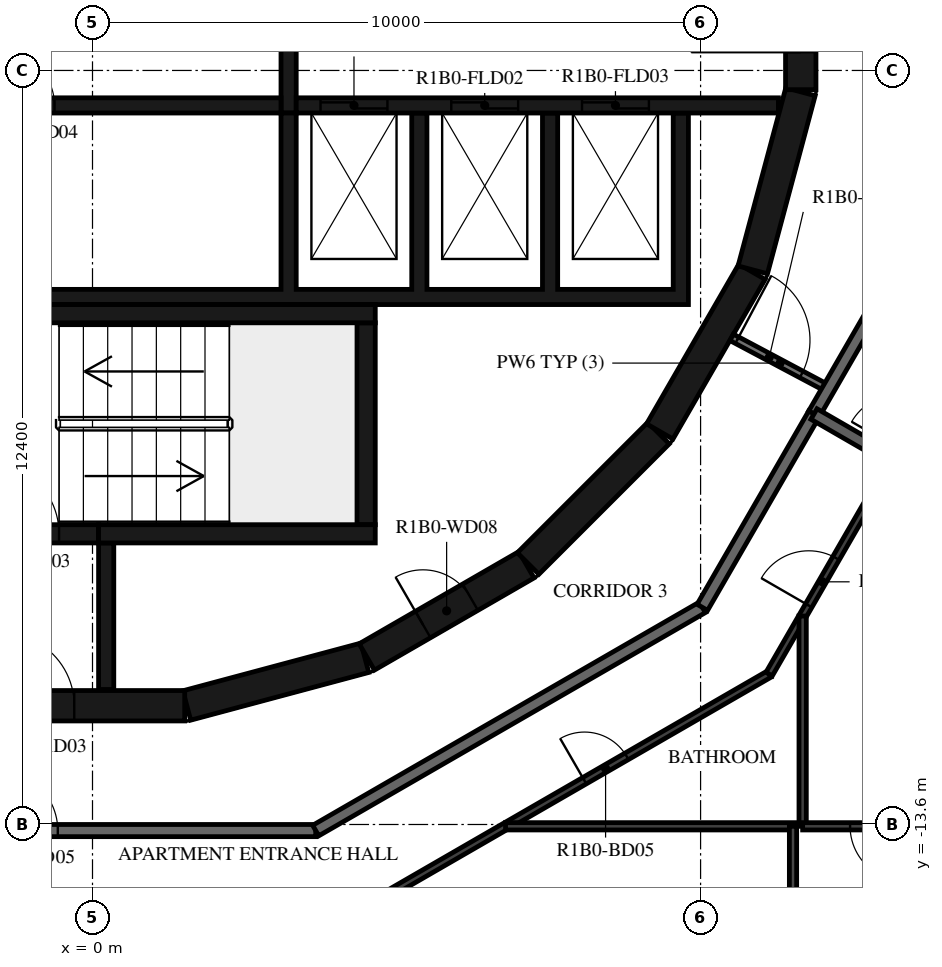
"""IFC4 building model, lengths in metres.
Left out: names, types, materials, properties, quantities, classifications, styles, units other than length and angle.
Written with IfcOpenShell. Run it as: python <this file> out.ifc"""

import sys

from ifc_helpers import new_model, si_unit, direction, frame, frame_2d, origin, place, context, subcontext, project, spatial, polyline, rectangle, outline, extrude, element, fill, save


model = new_model("IFC4")
c1 = context("Model", 3, precision=1e-05, world=origin(), true_north=direction((0.0, 1.0)))
c2 = subcontext(c1, "Body", "Model", "MODEL_VIEW")
j1 = project(units=[si_unit("LENGTHUNIT", "METRE"), si_unit("PLANEANGLEUNIT", "RADIAN")], contexts=[c1])
p1 = place(None, origin())
s1 = spatial("IfcSite", under=j1, at=p1, CompositionType="ELEMENT")
p2 = place(p1, origin())
s2 = spatial("IfcBuilding", under=s1, at=p2, CompositionType="ELEMENT")
p3 = place(p2, frame((0.0, 0.0, 52.4)))
s3 = spatial("IfcBuildingStorey", under=s2, at=p3, CompositionType="ELEMENT", Elevation=52.4)
p4 = place(p3, frame((1.55, -11.643, 0.0), z_axis=(0.0, 0.0, 1.0), x_axis=(0.965948410781, 0.258734743916, 0.0)))
e1 = element("IfcWall", 1, at=p4, inside=s3, PredefinedType="SHEAR", context=c2, shape_type="SweptSolid", body=[
    extrude(rectangle(XDim=3.033, YDim=0.5, at=frame_2d((1.516, 0.0))), origin(), (0.0, 0.0, 1.0), 3.12),
])
p5 = place(p3, frame((4.51, -10.845, 0.0), z_axis=(0.0, 0.0, 1.0), x_axis=(0.865975092491, 0.500087131594, 0.0)))
e2 = element("IfcWall", 2, at=p5, inside=s3, PredefinedType="SHEAR", context=c2, shape_type="SweptSolid", body=[
    extrude(rectangle(XDim=3.033, YDim=0.5, at=frame_2d((1.516, 0.0))), origin(), (0.0, 0.0, 1.0), 3.12),
])
p6 = place(p5, frame((1.066, 0.0, 0.0)))
e3 = element("IfcOpeningElement", 3, at=p6, cuts=e2, PredefinedType="OPENING", context=c2, shape_type="SweptSolid", body=[
    extrude(rectangle(XDim=0.9, YDim=2.1, at=frame_2d((0.45, 1.05))), frame((0.0, 0.26, 0.0), z_axis=(0.0, -1.0, 0.0), x_axis=(1.0, 0.0, 0.0)), (0.0, 0.0, 1.0), 0.52),
])
p7 = place(p3, frame((7.164, -9.308, 0.0), z_axis=(0.0, 0.0, 1.0), x_axis=(0.707106781187, 0.707106781187, 0.0)))
e4 = element("IfcWall", 4, at=p7, inside=s3, PredefinedType="SHEAR", context=c2, shape_type="SweptSolid", body=[
    extrude(rectangle(XDim=3.032, YDim=0.5, at=frame_2d((1.516, 0.0))), origin(), (0.0, 0.0, 1.0), 3.12),
])
for number, where, z_axis, x_axis in (
    (5, (9.329, -7.137, 0.0), (0.0, 0.0, 1.0), (0.5, 0.866, 0.0)),
    (6, (10.858, -4.479, 0.0), (0.0, 0.0, 1.0), (0.259, 0.966, 0.0)),
):
    element("IfcWall", number, at=place(p3, frame(where, z_axis=z_axis, x_axis=x_axis)), inside=s3, PredefinedType="SHEAR", context=c2, shape_type="SweptSolid", body=[
        extrude(rectangle(XDim=3.033, YDim=0.5, at=frame_2d((1.516, 0.0))), origin(), (0.0, 0.0, 1.0), 3.12),
    ])
p8 = place(p3, frame((11.647, -1.516, 0.0), z_axis=(0.0, 0.0, 1.0), x_axis=(0.0, 1.0, 0.0)))
e7 = element("IfcWall", 7, at=p8, inside=s3, PredefinedType="SHEAR", context=c2, shape_type="SweptSolid", body=[
    extrude(rectangle(XDim=3.033, YDim=0.5, at=frame_2d((1.516, 0.0))), origin(), (0.0, 0.0, 1.0), 3.12),
])
p9 = place(p8, frame((0.616, 0.0, 0.0)))
e8 = element("IfcOpeningElement", 8, at=p9, cuts=e7, PredefinedType="OPENING", context=c2, shape_type="SweptSolid", body=[
    extrude(rectangle(XDim=1.8, YDim=2.1, at=frame_2d((0.9, 1.05))), frame((0.0, 0.26, 0.0), z_axis=(0.0, -1.0, 0.0), x_axis=(1.0, 0.0, 0.0)), (0.0, 0.0, 1.0), 0.52),
])
p10 = place(p3, frame((-1.516, -11.647, 0.0), z_axis=(0.0, 0.0, 1.0), x_axis=(1.0, 0.0, 0.0)))
e9 = element("IfcWall", 9, at=p10, inside=s3, PredefinedType="SHEAR", context=c2, shape_type="SweptSolid", body=[
    extrude(rectangle(XDim=3.033, YDim=0.5, at=frame_2d((1.516, 0.0))), origin(), (0.0, 0.0, 1.0), 3.12),
])
p11 = place(p10, frame((0.016, 0.0, 0.0)))
e10 = element("IfcOpeningElement", 10, at=p11, cuts=e9, PredefinedType="OPENING", context=c2, shape_type="SweptSolid", body=[
    extrude(rectangle(XDim=1.2, YDim=2.1, at=frame_2d((0.6, 1.05))), frame((0.0, 0.26, 0.0), z_axis=(0.0, -1.0, 0.0), x_axis=(1.0, 0.0, 0.0)), (0.0, 0.0, 1.0), 0.52),
])
p12 = place(p3, frame((-2.4, -5.2, 0.0), z_axis=(0.0, 0.0, 1.0), x_axis=(1.0, 0.0, 0.0)))
e11 = element("IfcWall", 11, at=p12, inside=s3, PredefinedType="SHEAR", context=c2, shape_type="SweptSolid", body=[
    extrude(rectangle(XDim=7.05, YDim=0.3, at=frame_2d((3.525, 0.0))), origin(), (0.0, 0.0, 1.0), 3.12),
])
p13 = place(p3, frame((4.5, -8.67, 0.0), z_axis=(0.0, 0.0, 1.0), x_axis=(0.0, 1.0, 0.0)))
e12 = element("IfcWall", 12, at=p13, inside=s3, PredefinedType="SHEAR", context=c2, shape_type="SweptSolid", body=[
    extrude(rectangle(XDim=3.32, YDim=0.3, at=frame_2d((1.66, 0.0))), origin(), (0.0, 0.0, 1.0), 3.12),
])
p14 = place(p3, frame((0.1, -8.82, 0.0), z_axis=(0.0, 0.0, 1.0), x_axis=(1.0, 0.0, 0.0)))
e13 = element("IfcWall", 13, at=p14, inside=s3, PredefinedType="SHEAR", context=c2, shape_type="SweptSolid", body=[
    extrude(rectangle(XDim=4.55, YDim=0.3, at=frame_2d((2.275, 0.0))), origin(), (0.0, 0.0, 1.0), 3.12),
])
p15 = place(p3, frame((-2.4, -8.82, 0.0), z_axis=(0.0, 0.0, 1.0), x_axis=(1.0, 0.0, 0.0)))
e14 = element("IfcWall", 14, at=p15, inside=s3, PredefinedType="SHEAR", context=c2, shape_type="SweptSolid", body=[
    extrude(rectangle(XDim=2.5, YDim=0.3, at=frame_2d((1.25, 0.0))), origin(), (0.0, 0.0, 1.0), 3.12),
])
p16 = place(p15, frame((0.65, 0.0, 0.0)))
e15 = element("IfcOpeningElement", 15, at=p16, cuts=e14, PredefinedType="OPENING", context=c2, shape_type="SweptSolid", body=[
    extrude(rectangle(XDim=1.2, YDim=2.1, at=frame_2d((0.6, 1.05))), frame((0.0, 0.16, 0.0), z_axis=(0.0, -1.0, 0.0), x_axis=(1.0, 0.0, 0.0)), (0.0, 0.0, 1.0), 0.32),
])
p17 = place(p3, frame((0.225, -8.97, 0.0), z_axis=(0.0, 0.0, 1.0), x_axis=(0.0, -1.0, 0.0)))
e16 = element("IfcWall", 16, at=p17, inside=s3, PredefinedType="SHEAR", context=c2, shape_type="SweptSolid", body=[
    extrude(rectangle(XDim=2.41, YDim=0.25, at=frame_2d((1.205, 0.0))), origin(), (0.0, 0.0, 1.0), 3.12),
])
p18 = place(p3, origin())
e17 = element("IfcWall", 17, at=p18, inside=s3, PredefinedType="SHEAR", context=c2, shape_type="SweptSolid", body=[
    extrude(outline(polyline([(9.8, -5.05), (9.8, -4.8), (9.8, -1.9), (9.55, -1.9), (9.55, -4.8), (7.65, -4.8), (7.65, -1.9), (7.4, -1.9), (7.4, -4.8), (5.5, -4.8), (5.5, -1.9), (5.25, -1.9), (5.25, -4.8), (3.35, -4.8), (3.35, -1.9), (3.1, -1.9), (3.1, -4.8), (-5.25, -4.8), (-5.25, -1.9), (-5.5, -1.9), (-5.5, -4.8), (-7.4, -4.8), (-7.4, -1.9), (-7.65, -1.9), (-7.65, -4.8), (-9.55, -4.8), (-9.55, -1.9), (-9.8, -1.9), (-9.8, -4.8), (-9.8, -5.05), (9.8, -5.05)])), origin(), (0.0, 0.0, 1.0), 3.12),
])
p19 = place(p3, frame((-11.28, -1.775, 0.0), z_axis=(0.0, 0.0, 1.0), x_axis=(1.0, 0.0, 0.0)))
e18 = element("IfcWall", 18, at=p19, inside=s3, PredefinedType="SHEAR", context=c2, shape_type="SweptSolid", body=[
    extrude(rectangle(XDim=14.38, YDim=0.25, at=frame_2d((7.19, 0.0))), origin(), (0.0, 0.0, 1.0), 3.12),
])
p20 = place(p19, frame((9.755, 0.0, 0.0)))
e19 = element("IfcOpeningElement", 19, at=p20, cuts=e18, PredefinedType="OPENING", context=c2, shape_type="SweptSolid", body=[
    extrude(rectangle(XDim=0.9, YDim=2.1, at=frame_2d((0.45, 1.05))), frame((0.0, 0.135, 0.0), z_axis=(0.0, -1.0, 0.0), x_axis=(1.0, 0.0, 0.0)), (0.0, 0.0, 1.0), 0.27),
])
p21 = place(p3, frame((3.35, -1.775, 0.0), z_axis=(0.0, 0.0, 1.0), x_axis=(1.0, 0.0, 0.0)))
e20 = element("IfcWall", 20, at=p21, inside=s3, PredefinedType="SHEAR", context=c2, shape_type="SweptSolid", body=[
    extrude(rectangle(XDim=7.93, YDim=0.25, at=frame_2d((3.965, 0.0))), origin(), (0.0, 0.0, 1.0), 3.12),
])
p22 = place(p21, frame((0.4, 0.0, 0.0)))
e21 = element("IfcOpeningElement", 21, at=p22, cuts=e20, PredefinedType="OPENING", context=c2, shape_type="SweptSolid", body=[
    extrude(rectangle(XDim=1.1, YDim=2.4, at=frame_2d((0.55, 1.2))), frame((0.0, 0.135, 0.0), z_axis=(0.0, -1.0, 0.0), x_axis=(1.0, 0.0, 0.0)), (0.0, 0.0, 1.0), 0.27),
])
p23 = place(p21, frame((2.55, 0.0, 0.0)))
e22 = element("IfcOpeningElement", 22, at=p23, cuts=e20, PredefinedType="OPENING", context=c2, shape_type="SweptSolid", body=[
    extrude(rectangle(XDim=1.1, YDim=2.4, at=frame_2d((0.55, 1.2))), frame((0.0, 0.135, 0.0), z_axis=(0.0, -1.0, 0.0), x_axis=(1.0, 0.0, 0.0)), (0.0, 0.0, 1.0), 0.27),
])
p24 = place(p21, frame((4.7, 0.0, 0.0)))
e23 = element("IfcOpeningElement", 23, at=p24, cuts=e20, PredefinedType="OPENING", context=c2, shape_type="SweptSolid", body=[
    extrude(rectangle(XDim=1.1, YDim=2.4, at=frame_2d((0.55, 1.2))), frame((0.0, 0.135, 0.0), z_axis=(0.0, -1.0, 0.0), x_axis=(1.0, 0.0, 0.0)), (0.0, 0.0, 1.0), 0.27),
])
p25 = place(p3, frame((3.225, -1.9, 0.0), z_axis=(0.0, 0.0, 1.0), x_axis=(0.0, 1.0, 0.0)))
e24 = element("IfcWall", 24, at=p25, inside=s3, PredefinedType="SHEAR", context=c2, shape_type="SweptSolid", body=[
    extrude(rectangle(XDim=3.8, YDim=0.25, at=frame_2d((1.9, 0.0))), origin(), (0.0, 0.0, 1.0), 3.12),
])
p26 = place(p3, frame((10.511, -5.589, 0.0), z_axis=(0.0, 0.0, 1.0), x_axis=(0.88294043061, -0.469485032769, 0.0)))
e25 = element("IfcWall", 25, at=p26, inside=s3, PredefinedType="PARTITIONING", context=c2, shape_type="SweptSolid", body=[
    extrude(rectangle(XDim=1.804, YDim=0.12, at=frame_2d((0.902, 0.0))), origin(), (0.0, 0.0, 1.0), 3.12),
])
p27 = place(p26, frame((0.1, 0.0, 0.0)))
e26 = element("IfcOpeningElement", 26, at=p27, cuts=e25, PredefinedType="OPENING", context=c2, shape_type="SweptSolid", body=[
    extrude(rectangle(XDim=1.2, YDim=2.1, at=frame_2d((0.6, 1.05))), frame((0.0, 0.07, 0.0), z_axis=(0.0, -1.0, 0.0), x_axis=(1.0, 0.0, 0.0)), (0.0, 0.0, 1.0), 0.14),
])
p28 = place(p3, frame((11.865, -6.85, 0.0), z_axis=(0.0, 0.0, 1.0), x_axis=(0.499987270552, 0.86603275301, 0.0)))
e27 = element("IfcWall", 27, at=p28, inside=s3, PredefinedType="STANDARD", context=c2, shape_type="SweptSolid", body=[
    extrude(rectangle(XDim=3.671, YDim=0.2, at=frame_2d((1.835, 0.0))), origin(), (0.0, 0.0, 1.0), 3.12),
])
p29 = place(p3, frame((-3.671, -13.7, 0.0), z_axis=(0.0, 0.0, 1.0), x_axis=(1.0, 0.0, 0.0)))
e28 = element("IfcWall", 28, at=p29, inside=s3, PredefinedType="STANDARD", context=c2, shape_type="SweptSolid", body=[
    extrude(rectangle(XDim=7.342, YDim=0.2, at=frame_2d((3.671, 0.0))), origin(), (0.0, 0.0, 1.0), 3.12),
])
p30 = place(p29, frame((2.1, 0.0, 0.0)))
e29 = element("IfcOpeningElement", 29, at=p30, cuts=e28, PredefinedType="OPENING", context=c2, shape_type="SweptSolid", body=[
    extrude(rectangle(XDim=1.0, YDim=2.1, at=frame_2d((0.5, 1.05))), frame((0.0, 0.11, 0.0), z_axis=(0.0, -1.0, 0.0), x_axis=(1.0, 0.0, 0.0)), (0.0, 0.0, 1.0), 0.22),
])
p31 = place(p3, frame((3.671, -13.7, 0.0), z_axis=(0.0, 0.0, 1.0), x_axis=(0.866024439905, 0.500001669485, 0.0)))
e30 = element("IfcWall", 30, at=p31, inside=s3, PredefinedType="STANDARD", context=c2, shape_type="SweptSolid", body=[
    extrude(rectangle(XDim=7.342, YDim=0.2, at=frame_2d((3.671, 0.0))), origin(), (0.0, 0.0, 1.0), 3.12),
])
p32 = place(p3, frame((10.029, -10.029, 0.0), z_axis=(0.0, 0.0, 1.0), x_axis=(0.50001606911, 0.866016126081, 0.0)))
e31 = element("IfcWall", 31, at=p32, inside=s3, PredefinedType="STANDARD", context=c2, shape_type="SweptSolid", body=[
    extrude(rectangle(XDim=3.671, YDim=0.2, at=frame_2d((1.835, 0.0))), origin(), (0.0, 0.0, 1.0), 3.12),
])
p33 = place(p3, frame((16.817, -9.709, 0.0), z_axis=(0.0, 0.0, 1.0), x_axis=(-0.86604338933, 0.499968846828, 0.0)))
e32 = element("IfcWall", 32, at=p33, inside=s3, PredefinedType="STANDARD", context=c2, shape_type="SweptSolid", body=[
    extrude(rectangle(XDim=5.718, YDim=0.2, at=frame_2d((2.859, 0.0))), origin(), (0.0, 0.0, 1.0), 3.12),
])
p34 = place(p3, frame((4.613, -14.888, 0.0), z_axis=(0.0, 0.0, 1.0), x_axis=(0.866025608725, 0.499999645032, 0.0)))
e33 = element("IfcWall", 33, at=p34, inside=s3, PredefinedType="PARTITIONING", context=c2, shape_type="SweptSolid", body=[
    extrude(rectangle(XDim=7.522, YDim=0.12, at=frame_2d((3.761, 0.0))), origin(), (0.0, 0.0, 1.0), 3.12),
])
p35 = place(p34, frame((4.017, 0.0, 0.0)))
e34 = element("IfcOpeningElement", 34, at=p35, cuts=e33, PredefinedType="OPENING", context=c2, shape_type="SweptSolid", body=[
    extrude(rectangle(XDim=0.8, YDim=2.1, at=frame_2d((0.4, 1.05))), frame((0.0, 0.07, 0.0), z_axis=(0.0, -1.0, 0.0), x_axis=(1.0, 0.0, 0.0)), (0.0, 0.0, 1.0), 0.14),
])
p36 = place(p3, frame((11.127, -11.127, 0.0), z_axis=(0.0, 0.0, 1.0), x_axis=(0.499987950692, 0.866032360344, 0.0)))
e35 = element("IfcWall", 35, at=p36, inside=s3, PredefinedType="PARTITIONING", context=c2, shape_type="SweptSolid", body=[
    extrude(rectangle(XDim=8.146, YDim=0.12, at=frame_2d((4.073, 0.0))), origin(), (0.0, 0.0, 1.0), 3.12),
])
p37 = place(p36, frame((1.303, 0.0, 0.0)))
e36 = element("IfcOpeningElement", 36, at=p37, cuts=e35, PredefinedType="OPENING", context=c2, shape_type="SweptSolid", body=[
    extrude(rectangle(XDim=0.9, YDim=2.1, at=frame_2d((0.45, 1.05))), frame((0.0, 0.07, 0.0), z_axis=(0.0, -1.0, 0.0), x_axis=(1.0, 0.0, 0.0)), (0.0, 0.0, 1.0), 0.14),
])
p38 = place(p36, frame((4.273, 0.0, 0.0)))
e37 = element("IfcOpeningElement", 37, at=p38, cuts=e35, PredefinedType="OPENING", context=c2, shape_type="SweptSolid", body=[
    extrude(rectangle(XDim=0.9, YDim=2.1, at=frame_2d((0.45, 1.05))), frame((0.0, 0.07, 0.0), z_axis=(0.0, -1.0, 0.0), x_axis=(1.0, 0.0, 0.0)), (0.0, 0.0, 1.0), 0.14),
])
p39 = place(p3, frame((11.56, -13.63, 0.0), z_axis=(0.0, 0.0, 1.0), x_axis=(-1.0, 0.0, 0.0)))
e38 = element("IfcWall", 38, at=p39, inside=s3, PredefinedType="PARTITIONING", context=c2, shape_type="SweptSolid", body=[
    extrude(rectangle(XDim=4.768, YDim=0.12, at=frame_2d((2.384, 0.0))), origin(), (0.0, 0.0, 1.0), 3.12),
])
p40 = place(p3, frame((11.52, -19.63, 0.0), z_axis=(0.0, 0.0, 1.0), x_axis=(0.0, 1.0, 0.0)))
e39 = element("IfcWall", 39, at=p40, inside=s3, PredefinedType="PARTITIONING", context=c2, shape_type="SweptSolid", body=[
    extrude(rectangle(XDim=6.0, YDim=0.12, at=frame_2d((3.0, 0.0))), origin(), (0.0, 0.0, 1.0), 2.73),
])
p41 = place(p3, frame((11.678, -13.63, 0.0), z_axis=(0.0, 0.0, 1.0), x_axis=(0.0, 1.0, 0.0)))
e40 = element("IfcWall", 40, at=p41, inside=s3, PredefinedType="PARTITIONING", context=c2, shape_type="SweptSolid", body=[
    extrude(rectangle(XDim=3.458, YDim=0.12, at=frame_2d((1.729, 0.0))), origin(), (0.0, 0.0, 1.0), 3.12),
])
p42 = place(p3, frame((19.794, -13.63, 0.0), z_axis=(0.0, 0.0, 1.0), x_axis=(-1.0, 0.0, 0.0)))
e41 = element("IfcWall", 41, at=p42, inside=s3, PredefinedType="PARTITIONING", context=c2, shape_type="SweptSolid", body=[
    extrude(rectangle(XDim=8.116, YDim=0.12, at=frame_2d((4.058, 0.0))), origin(), (0.0, 0.0, 1.0), 3.12),
])
p43 = place(p42, frame((6.436, 0.0, 0.0)))
e42 = element("IfcOpeningElement", 42, at=p43, cuts=e41, PredefinedType="OPENING", context=c2, shape_type="SweptSolid", body=[
    extrude(rectangle(XDim=0.9, YDim=2.1, at=frame_2d((0.45, 1.05))), frame((0.0, 0.07, 0.0), z_axis=(0.0, -1.0, 0.0), x_axis=(1.0, 0.0, 0.0)), (0.0, 0.0, 1.0), 0.14),
])
p44 = place(p42, frame((1.6, 0.0, 0.0)))
e43 = element("IfcOpeningElement", 43, at=p44, cuts=e41, PredefinedType="OPENING", context=c2, shape_type="SweptSolid", body=[
    extrude(rectangle(XDim=0.9, YDim=2.1, at=frame_2d((0.45, 1.05))), frame((0.0, 0.07, 0.0), z_axis=(0.0, -1.0, 0.0), x_axis=(1.0, 0.0, 0.0)), (0.0, 0.0, 1.0), 0.14),
])
p45 = place(p16, origin())
e44 = element("IfcDoor", 44, at=p45, inside=s3, OperationType="SINGLE_SWING_LEFT", PredefinedType="DOOR", context=c2, shape_type="SweptSolid", body=[
    extrude(rectangle(XDim=1.2, YDim=2.1, at=frame_2d((0.6, 1.05))), frame((0.0, 0.025, 0.0), z_axis=(0.0, -1.0, 0.0), x_axis=(1.0, 0.0, 0.0)), (0.0, 0.0, 1.0), 0.05),
])
fill(e15, e44)
p46 = place(p11, origin())
e45 = element("IfcDoor", 45, at=p46, inside=s3, OperationType="SINGLE_SWING_RIGHT", PredefinedType="DOOR", context=c2, shape_type="SweptSolid", body=[
    extrude(rectangle(XDim=1.2, YDim=2.1, at=frame_2d((0.6, 1.05))), frame((0.0, 0.025, 0.0), z_axis=(0.0, -1.0, 0.0), x_axis=(1.0, 0.0, 0.0)), (0.0, 0.0, 1.0), 0.05),
])
fill(e10, e45)
p47 = place(p9, origin())
e46 = element("IfcDoor", 46, at=p47, inside=s3, OperationType="DOUBLE_DOOR_SINGLE_SWING", PredefinedType="DOOR", context=c2, shape_type="SweptSolid", body=[
    extrude(rectangle(XDim=1.8, YDim=2.1, at=frame_2d((0.9, 1.05))), frame((0.0, 0.025, 0.0), z_axis=(0.0, -1.0, 0.0), x_axis=(1.0, 0.0, 0.0)), (0.0, 0.0, 1.0), 0.05),
])
fill(e8, e46)
p48 = place(p22, origin())
e47 = element("IfcDoor", 47, at=p48, inside=s3, OperationType="DOUBLE_DOOR_SLIDING", PredefinedType="DOOR", context=c2, shape_type="SweptSolid", body=[
    extrude(rectangle(XDim=1.1, YDim=2.4, at=frame_2d((0.55, 1.2))), frame((0.0, 0.025, 0.0), z_axis=(0.0, -1.0, 0.0), x_axis=(1.0, 0.0, 0.0)), (0.0, 0.0, 1.0), 0.05),
])
fill(e21, e47)
p49 = place(p23, origin())
e48 = element("IfcDoor", 48, at=p49, inside=s3, OperationType="DOUBLE_DOOR_SLIDING", PredefinedType="DOOR", context=c2, shape_type="SweptSolid", body=[
    extrude(rectangle(XDim=1.1, YDim=2.4, at=frame_2d((0.55, 1.2))), frame((0.0, 0.025, 0.0), z_axis=(0.0, -1.0, 0.0), x_axis=(1.0, 0.0, 0.0)), (0.0, 0.0, 1.0), 0.05),
])
fill(e22, e48)
p50 = place(p24, origin())
e49 = element("IfcDoor", 49, at=p50, inside=s3, OperationType="DOUBLE_DOOR_SLIDING", PredefinedType="DOOR", context=c2, shape_type="SweptSolid", body=[
    extrude(rectangle(XDim=1.1, YDim=2.4, at=frame_2d((0.55, 1.2))), frame((0.0, 0.025, 0.0), z_axis=(0.0, -1.0, 0.0), x_axis=(1.0, 0.0, 0.0)), (0.0, 0.0, 1.0), 0.05),
])
fill(e23, e49)
p51 = place(p20, origin())
e50 = element("IfcDoor", 50, at=p51, inside=s3, OperationType="SINGLE_SWING_LEFT", PredefinedType="DOOR", context=c2, shape_type="SweptSolid", body=[
    extrude(rectangle(XDim=0.9, YDim=2.1, at=frame_2d((0.45, 1.05))), frame((0.0, 0.025, 0.0), z_axis=(0.0, -1.0, 0.0), x_axis=(1.0, 0.0, 0.0)), (0.0, 0.0, 1.0), 0.05),
])
fill(e19, e50)
p52 = place(p6, origin())
e51 = element("IfcDoor", 51, at=p52, inside=s3, OperationType="SINGLE_SWING_LEFT", PredefinedType="DOOR", context=c2, shape_type="SweptSolid", body=[
    extrude(rectangle(XDim=0.9, YDim=2.1, at=frame_2d((0.45, 1.05))), frame((0.0, 0.025, 0.0), z_axis=(0.0, -1.0, 0.0), x_axis=(1.0, 0.0, 0.0)), (0.0, 0.0, 1.0), 0.05),
])
fill(e3, e51)
p53 = place(p30, origin())
e52 = element("IfcDoor", 52, at=p53, inside=s3, OperationType="SINGLE_SWING_LEFT", PredefinedType="DOOR", context=c2, shape_type="SweptSolid", body=[
    extrude(rectangle(XDim=1.0, YDim=2.1, at=frame_2d((0.5, 1.05))), frame((0.0, 0.025, 0.0), z_axis=(0.0, -1.0, 0.0), x_axis=(1.0, 0.0, 0.0)), (0.0, 0.0, 1.0), 0.05),
])
fill(e29, e52)
p54 = place(p35, origin())
e53 = element("IfcDoor", 53, at=p54, inside=s3, OperationType="SINGLE_SWING_RIGHT", PredefinedType="DOOR", context=c2, shape_type="SweptSolid", body=[
    extrude(rectangle(XDim=0.8, YDim=2.1, at=frame_2d((0.4, 1.05))), frame((0.0, 0.025, 0.0), z_axis=(0.0, -1.0, 0.0), x_axis=(1.0, 0.0, 0.0)), (0.0, 0.0, 1.0), 0.05),
])
fill(e34, e53)
p55 = place(p37, origin())
e54 = element("IfcDoor", 54, at=p55, inside=s3, OperationType="SINGLE_SWING_RIGHT", PredefinedType="DOOR", context=c2, shape_type="SweptSolid", body=[
    extrude(rectangle(XDim=0.9, YDim=2.1, at=frame_2d((0.45, 1.05))), frame((0.0, 0.025, 0.0), z_axis=(0.0, -1.0, 0.0), x_axis=(1.0, 0.0, 0.0)), (0.0, 0.0, 1.0), 0.05),
])
fill(e36, e54)
p56 = place(p43, origin())
e55 = element("IfcDoor", 55, at=p56, inside=s3, OperationType="SINGLE_SWING_RIGHT", PredefinedType="DOOR", context=c2, shape_type="SweptSolid", body=[
    extrude(rectangle(XDim=0.9, YDim=2.1, at=frame_2d((0.45, 1.05))), frame((0.0, 0.025, 0.0), z_axis=(0.0, -1.0, 0.0), x_axis=(1.0, 0.0, 0.0)), (0.0, 0.0, 1.0), 0.05),
])
fill(e42, e55)
p57 = place(p27, origin())
e56 = element("IfcDoor", 56, at=p57, inside=s3, OperationType="DOUBLE_DOOR_SINGLE_SWING", PredefinedType="DOOR", context=c2, shape_type="SweptSolid", body=[
    extrude(rectangle(XDim=1.2, YDim=2.1, at=frame_2d((0.6, 1.05))), frame((0.0, 0.025, 0.0), z_axis=(0.0, -1.0, 0.0), x_axis=(1.0, 0.0, 0.0)), (0.0, 0.0, 1.0), 0.05),
])
fill(e26, e56)
save(model, sys.argv[1])
